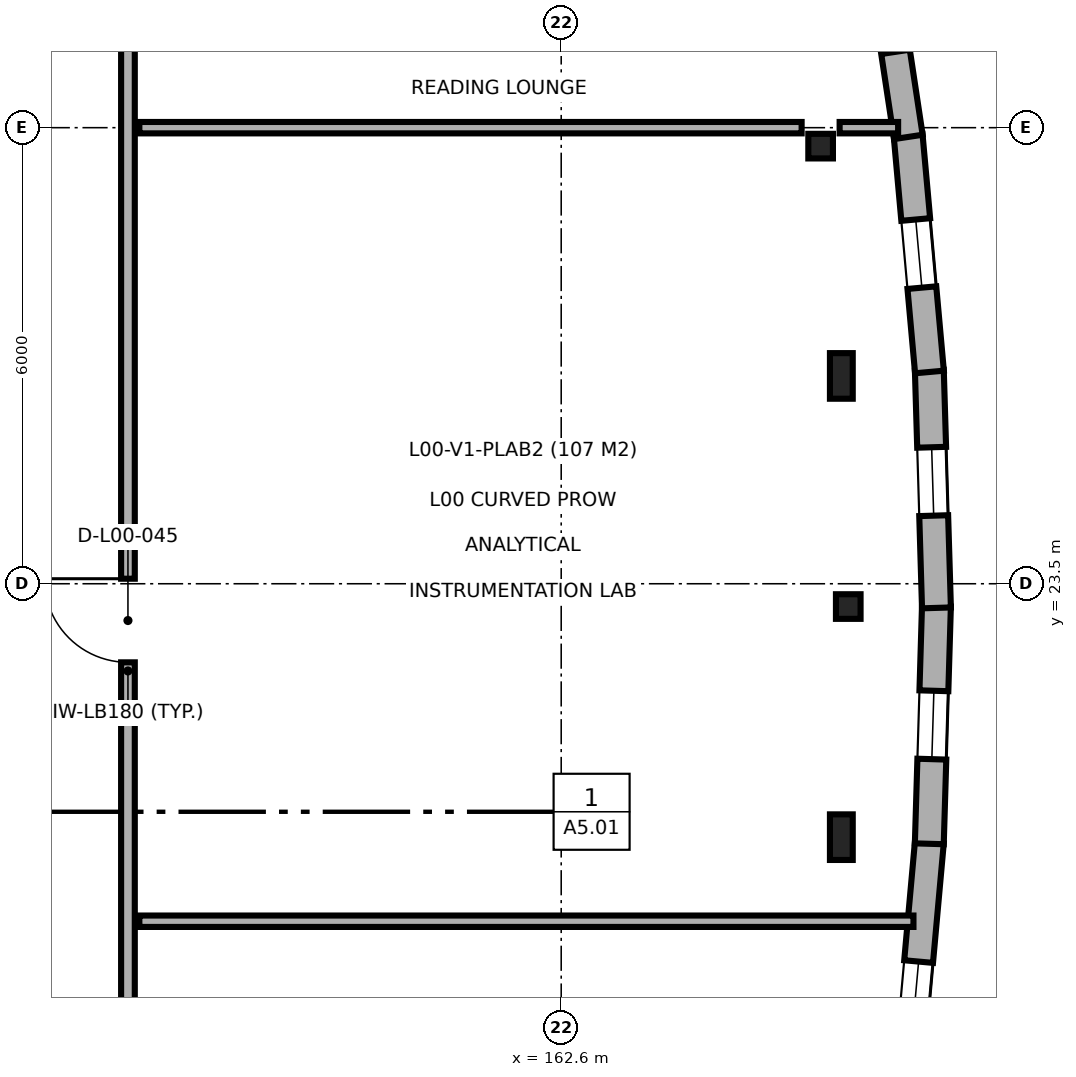
"""IFC4 building model, lengths in metres.
Left out: names, types, materials, properties, quantities, classifications, styles, units other than length and angle.
Written with IfcOpenShell. Run it as: python <this file> out.ifc"""

import sys

from ifc_helpers import new_model, si_unit, direction, frame, frame_2d, origin, origin_2d, place, context, subcontext, project, spatial, rectangle, hollow_circle, i_section, extrude, element, fill, save


model = new_model("IFC4")
c1 = context("Model", 3, precision=1e-05, world=origin(), true_north=direction((0.0, 1.0)))
c2 = subcontext(c1, "Body", "Model", "MODEL_VIEW")
j1 = project(units=[si_unit("LENGTHUNIT", "METRE"), si_unit("PLANEANGLEUNIT", "RADIAN")], contexts=[c1])
p1 = place(None, origin())
s1 = spatial("IfcSite", under=j1, at=p1, CompositionType="ELEMENT")
p2 = place(p1, origin())
s2 = spatial("IfcBuilding", under=s1, at=p2, CompositionType="ELEMENT")
p3 = place(p2, origin())
s3 = spatial("IfcBuildingStorey", under=s2, at=p3, CompositionType="ELEMENT", Elevation=0.0)
p4 = place(p3, frame((166.013, 29.257, 0.0), z_axis=(0.0, 0.0, 1.0), x_axis=(1.0, 0.0, 0.0)))
e1 = element("IfcColumn", 1, at=p4, inside=s3, PredefinedType="COLUMN", context=c2, shape_type="SweptSolid", body=[
    extrude(hollow_circle(Radius=0.162, WallThickness=0.016, at=origin_2d()), origin(), (0.0, 0.0, 1.0), 4.8),
])
for number, where, z_axis, x_axis in (
    (2, (166.285, 20.166, 0.0), (0.0, 0.0, 1.0), (1.0, 0.0, 0.0)),
    (3, (166.285, 26.234, 0.0), (0.0, 0.0, 1.0), (1.0, 0.0, 0.0)),
):
    element("IfcColumn", number, at=place(p3, frame(where, z_axis=z_axis, x_axis=x_axis)), inside=s3, PredefinedType="COLUMN", context=c2, shape_type="SweptSolid", body=[
        extrude(i_section(OverallWidth=0.3, OverallDepth=0.6, WebThickness=0.015, FlangeThickness=0.03, FilletRadius=0.027, at=origin_2d()), origin(), (0.0, 0.0, 1.0), 4.8),
    ])
p5 = place(p3, frame((166.376, 23.2, 0.0), z_axis=(0.0, 0.0, 1.0), x_axis=(1.0, 0.0, 0.0)))
e4 = element("IfcColumn", 4, at=p5, inside=s3, PredefinedType="COLUMN", context=c2, shape_type="SweptSolid", body=[
    extrude(hollow_circle(Radius=0.162, WallThickness=0.016, at=origin_2d()), origin(), (0.0, 0.0, 1.0), 4.8),
])
p6 = place(p3, frame((167.163, 16.987, 0.0), z_axis=(0.0, 0.0, 1.0), x_axis=(0.089747627339, 0.995964539222, 0.0)))
e5 = element("IfcWall", 5, at=p6, inside=s3, PredefinedType="SOLIDWALL", context=c2, shape_type="SweptSolid", body=[
    extrude(rectangle(XDim=3.128, YDim=0.38, at=frame_2d((1.564, 0.0))), origin(), (0.0, 0.0, 1.0), 4.55),
])
p7 = place(p6, frame((0.649, 0.0, 0.9)))
e6 = element("IfcOpeningElement", 6, at=p7, cuts=e5, PredefinedType="OPENING", context=c2, shape_type="SweptSolid", body=[
    extrude(rectangle(XDim=0.9, YDim=1.8, at=frame_2d((0.45, 0.9))), frame((0.0, 0.2, 0.0), z_axis=(0.0, -1.0, 0.0), x_axis=(1.0, 0.0, 0.0)), (0.0, 0.0, 1.0), 0.4),
])
p8 = place(p3, frame((167.443, 20.079, 0.0), z_axis=(0.0, 0.0, 1.0), x_axis=(0.02996779607, 0.999550864738, 0.0)))
e7 = element("IfcWall", 7, at=p8, inside=s3, PredefinedType="SOLIDWALL", context=c2, shape_type="SweptSolid", body=[
    extrude(rectangle(XDim=3.128, YDim=0.38, at=frame_2d((1.564, 0.0))), origin(), (0.0, 0.0, 1.0), 4.55),
])
p9 = place(p8, frame((1.114, 0.0, 0.9)))
e8 = element("IfcOpeningElement", 8, at=p9, cuts=e7, PredefinedType="OPENING", context=c2, shape_type="SweptSolid", body=[
    extrude(rectangle(XDim=0.9, YDim=1.8, at=frame_2d((0.45, 0.9))), frame((0.0, 0.2, 0.0), z_axis=(0.0, -1.0, 0.0), x_axis=(1.0, 0.0, 0.0)), (0.0, 0.0, 1.0), 0.4),
])
p10 = place(p3, frame((167.537, 23.182, 0.0), z_axis=(0.0, 0.0, 1.0), x_axis=(-0.029970133922, 0.999550794644, 0.0)))
e9 = element("IfcWall", 9, at=p10, inside=s3, PredefinedType="SOLIDWALL", context=c2, shape_type="SweptSolid", body=[
    extrude(rectangle(XDim=3.128, YDim=0.38, at=frame_2d((1.564, 0.0))), origin(), (0.0, 0.0, 1.0), 4.55),
])
p11 = place(p10, frame((1.214, 0.0, 0.9)))
e10 = element("IfcOpeningElement", 10, at=p11, cuts=e9, PredefinedType="OPENING", context=c2, shape_type="SweptSolid", body=[
    extrude(rectangle(XDim=0.9, YDim=1.8, at=frame_2d((0.45, 0.9))), frame((0.0, 0.2, 0.0), z_axis=(0.0, -1.0, 0.0), x_axis=(1.0, 0.0, 0.0)), (0.0, 0.0, 1.0), 0.4),
])
p12 = place(p3, frame((167.445, 26.286, 0.0), z_axis=(0.0, 0.0, 1.0), x_axis=(-0.089747627339, 0.995964539222, 0.0)))
e11 = element("IfcWall", 11, at=p12, inside=s3, PredefinedType="SOLIDWALL", context=c2, shape_type="SweptSolid", body=[
    extrude(rectangle(XDim=3.128, YDim=0.38, at=frame_2d((1.564, 0.0))), origin(), (0.0, 0.0, 1.0), 4.55),
])
p13 = place(p12, frame((1.114, 0.0, 0.9)))
e12 = element("IfcOpeningElement", 12, at=p13, cuts=e11, PredefinedType="OPENING", context=c2, shape_type="SweptSolid", body=[
    extrude(rectangle(XDim=0.9, YDim=1.8, at=frame_2d((0.45, 0.9))), frame((0.0, 0.2, 0.0), z_axis=(0.0, -1.0, 0.0), x_axis=(1.0, 0.0, 0.0)), (0.0, 0.0, 1.0), 0.4),
])
p14 = place(p3, frame((167.167, 29.378, 0.0), z_axis=(0.0, 0.0, 1.0), x_axis=(-0.149305964746, 0.988791044099, 0.0)))
e13 = element("IfcWall", 13, at=p14, inside=s3, PredefinedType="SOLIDWALL", context=c2, shape_type="SweptSolid", body=[
    extrude(rectangle(XDim=3.128, YDim=0.38, at=frame_2d((1.564, 0.0))), origin(), (0.0, 0.0, 1.0), 4.55),
])
p15 = place(p14, frame((1.132, 0.0, 0.9)))
e14 = element("IfcOpeningElement", 14, at=p15, cuts=e13, PredefinedType="OPENING", context=c2, shape_type="SweptSolid", body=[
    extrude(rectangle(XDim=0.9, YDim=1.8, at=frame_2d((0.45, 0.9))), frame((0.0, 0.2, 0.0), z_axis=(0.0, -1.0, 0.0), x_axis=(1.0, 0.0, 0.0)), (0.0, 0.0, 1.0), 0.4),
])
p16 = place(p3, frame((156.9, 5.205, 0.0), z_axis=(0.0, 0.0, 1.0), x_axis=(0.0, 1.0, 0.0)))
e15 = element("IfcWall", 15, at=p16, inside=s3, PredefinedType="PARTITIONING", context=c2, shape_type="SweptSolid", body=[
    extrude(rectangle(XDim=34.295, YDim=0.18, at=frame_2d((17.147, 0.0))), origin(), (0.0, 0.0, 1.0), 4.55),
])
p17 = place(p16, frame((6.559, 0.0, 0.0)))
e16 = element("IfcOpeningElement", 16, at=p17, cuts=e15, PredefinedType="OPENING", context=c2, shape_type="SweptSolid", body=[
    extrude(rectangle(XDim=1.5, YDim=2.2, at=frame_2d((0.75, 1.1))), frame((0.0, 0.1, 0.0), z_axis=(0.0, -1.0, 0.0), x_axis=(1.0, 0.0, 0.0)), (0.0, 0.0, 1.0), 0.2),
])
p18 = place(p16, frame((17.261, 0.0, 0.0)))
e17 = element("IfcOpeningElement", 17, at=p18, cuts=e15, PredefinedType="OPENING", context=c2, shape_type="SweptSolid", body=[
    extrude(rectangle(XDim=1.1, YDim=2.15, at=frame_2d((0.55, 1.075))), frame((0.0, 0.1, 0.0), z_axis=(0.0, -1.0, 0.0), x_axis=(1.0, 0.0, 0.0)), (0.0, 0.0, 1.0), 0.2),
])
p19 = place(p16, frame((27.343, 0.0, 0.0)))
e18 = element("IfcOpeningElement", 18, at=p19, cuts=e15, PredefinedType="OPENING", context=c2, shape_type="SweptSolid", body=[
    extrude(rectangle(XDim=0.95, YDim=2.1, at=frame_2d((0.475, 1.05))), frame((0.0, 0.1, 0.0), z_axis=(0.0, -1.0, 0.0), x_axis=(1.0, 0.0, 0.0)), (0.0, 0.0, 1.0), 0.2),
])
p20 = place(p3, frame((157.05, 19.06, 0.0), z_axis=(0.0, 0.0, 1.0), x_axis=(1.0, 0.0, 0.0)))
e19 = element("IfcWall", 19, at=p20, inside=s3, PredefinedType="PARTITIONING", context=c2, shape_type="SweptSolid", body=[
    extrude(rectangle(XDim=10.184, YDim=0.15, at=frame_2d((5.092, 0.0))), origin(), (0.0, 0.0, 1.0), 4.05),
])
p21 = place(p3, frame((157.05, 29.5, 0.0), z_axis=(0.0, 0.0, 1.0), x_axis=(1.0, 0.0, 0.0)))
e20 = element("IfcWall", 20, at=p21, inside=s3, PredefinedType="PARTITIONING", context=c2, shape_type="SweptSolid", body=[
    extrude(rectangle(XDim=8.713, YDim=0.15, at=frame_2d((4.356, 0.0))), origin(), (0.0, 0.0, 1.0), 4.05),
])
p22 = place(p3, frame((166.263, 29.5, 0.0), z_axis=(0.0, 0.0, 1.0), x_axis=(1.0, 0.0, 0.0)))
e21 = element("IfcWall", 21, at=p22, inside=s3, PredefinedType="PARTITIONING", context=c2, shape_type="SweptSolid", body=[
    extrude(rectangle(XDim=0.77, YDim=0.15, at=frame_2d((0.385, 0.0))), origin(), (0.0, 0.0, 1.0), 4.55),
])
p23 = place(p7, origin())
e22 = element("IfcWindow", 22, at=p23, inside=s3, PartitioningType="SINGLE_PANEL", PredefinedType="WINDOW", context=c2, shape_type="SweptSolid", body=[
    extrude(rectangle(XDim=0.9, YDim=1.8, at=frame_2d((0.45, 0.9))), frame((0.0, 0.03, 0.0), z_axis=(0.0, -1.0, 0.0), x_axis=(1.0, 0.0, 0.0)), (0.0, 0.0, 1.0), 0.06),
])
fill(e6, e22)
p24 = place(p9, origin())
e23 = element("IfcWindow", 23, at=p24, inside=s3, PartitioningType="SINGLE_PANEL", PredefinedType="WINDOW", context=c2, shape_type="SweptSolid", body=[
    extrude(rectangle(XDim=0.9, YDim=1.8, at=frame_2d((0.45, 0.9))), frame((0.0, 0.03, 0.0), z_axis=(0.0, -1.0, 0.0), x_axis=(1.0, 0.0, 0.0)), (0.0, 0.0, 1.0), 0.06),
])
fill(e8, e23)
p25 = place(p11, origin())
e24 = element("IfcWindow", 24, at=p25, inside=s3, PartitioningType="SINGLE_PANEL", PredefinedType="WINDOW", context=c2, shape_type="SweptSolid", body=[
    extrude(rectangle(XDim=0.9, YDim=1.8, at=frame_2d((0.45, 0.9))), frame((0.0, 0.03, 0.0), z_axis=(0.0, -1.0, 0.0), x_axis=(1.0, 0.0, 0.0)), (0.0, 0.0, 1.0), 0.06),
])
fill(e10, e24)
p26 = place(p13, origin())
e25 = element("IfcWindow", 25, at=p26, inside=s3, PartitioningType="SINGLE_PANEL", PredefinedType="WINDOW", context=c2, shape_type="SweptSolid", body=[
    extrude(rectangle(XDim=0.9, YDim=1.8, at=frame_2d((0.45, 0.9))), frame((0.0, 0.03, 0.0), z_axis=(0.0, -1.0, 0.0), x_axis=(1.0, 0.0, 0.0)), (0.0, 0.0, 1.0), 0.06),
])
fill(e12, e25)
p27 = place(p15, origin())
e26 = element("IfcWindow", 26, at=p27, inside=s3, PartitioningType="SINGLE_PANEL", PredefinedType="WINDOW", context=c2, shape_type="SweptSolid", body=[
    extrude(rectangle(XDim=0.9, YDim=1.8, at=frame_2d((0.45, 0.9))), frame((0.0, 0.03, 0.0), z_axis=(0.0, -1.0, 0.0), x_axis=(1.0, 0.0, 0.0)), (0.0, 0.0, 1.0), 0.06),
])
fill(e14, e26)
p28 = place(p18, origin())
e27 = element("IfcDoor", 27, at=p28, inside=s3, OperationType="SINGLE_SWING_RIGHT", PredefinedType="DOOR", context=c2, shape_type="SweptSolid", body=[
    extrude(rectangle(XDim=1.1, YDim=2.15, at=frame_2d((0.55, 1.075))), frame((0.0, 0.025, 0.0), z_axis=(0.0, -1.0, 0.0), x_axis=(1.0, 0.0, 0.0)), (0.0, 0.0, 1.0), 0.05),
])
fill(e17, e27)
save(model, sys.argv[1])
